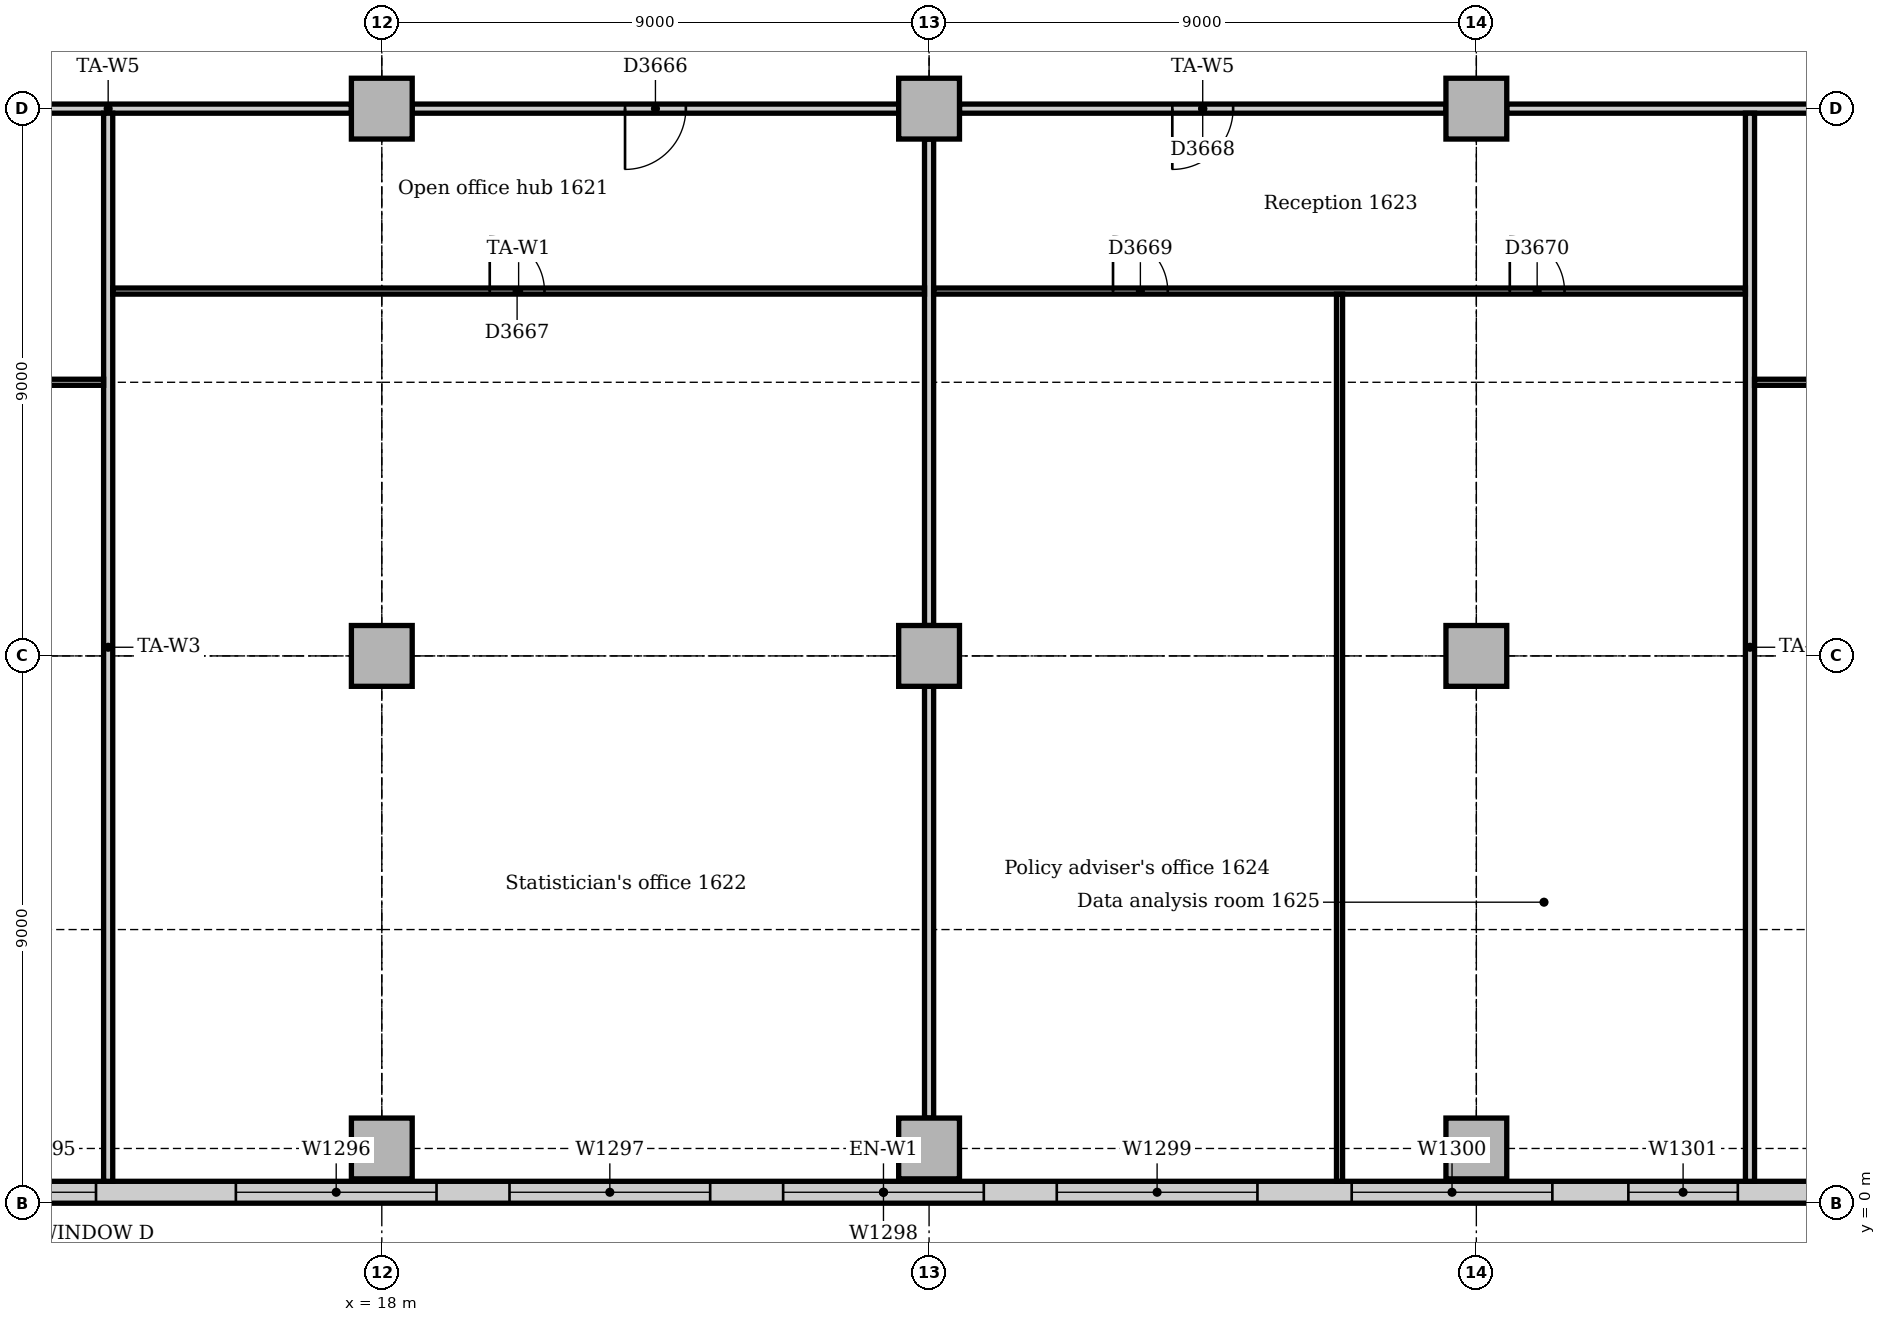
"""IFC4 building model, lengths in metres.
Left out: names, types, materials, properties, quantities, classifications, styles, units other than length and angle.
Written with IfcOpenShell. Run it as: python <this file> out.ifc"""

import sys

from ifc_helpers import new_model, si_unit, direction, frame, frame_2d, origin, origin_2d, place, context, subcontext, project, spatial, rectangle, extrude, element, fill, save


model = new_model("IFC4")
c1 = context("Model", 3, precision=1e-05, world=origin(), true_north=direction((0.0, 1.0)))
c2 = subcontext(c1, "Body", "Model", "MODEL_VIEW")
j1 = project(units=[si_unit("LENGTHUNIT", "METRE"), si_unit("PLANEANGLEUNIT", "RADIAN")], contexts=[c1])
p1 = place(None, origin())
s1 = spatial("IfcSite", under=j1, at=p1, CompositionType="ELEMENT")
p2 = place(p1, origin())
s2 = spatial("IfcBuilding", under=s1, at=p2, CompositionType="ELEMENT")
p3 = place(p2, frame((0.0, 0.0, 71.0)))
s3 = spatial("IfcBuildingStorey", under=s2, at=p3, CompositionType="ELEMENT", Elevation=71.0)
for number, where, z_axis, x_axis in (
    (1, (18.0, 0.9, 0.0), (0.0, 0.0, 1.0), (1.0, 0.0, 0.0)),
    (2, (27.0, 0.9, 0.0), (0.0, 0.0, 1.0), (1.0, 0.0, 0.0)),
    (3, (36.0, 0.9, 0.0), (0.0, 0.0, 1.0), (1.0, 0.0, 0.0)),
    (4, (18.0, 9.0, 0.0), (0.0, 0.0, 1.0), (1.0, 0.0, 0.0)),
    (5, (18.0, 18.0, 0.0), (0.0, 0.0, 1.0), (1.0, 0.0, 0.0)),
    (6, (27.0, 9.0, 0.0), (0.0, 0.0, 1.0), (1.0, 0.0, 0.0)),
    (7, (27.0, 18.0, 0.0), (0.0, 0.0, 1.0), (1.0, 0.0, 0.0)),
    (8, (36.0, 9.0, 0.0), (0.0, 0.0, 1.0), (1.0, 0.0, 0.0)),
    (9, (36.0, 18.0, 0.0), (0.0, 0.0, 1.0), (1.0, 0.0, 0.0)),
):
    element("IfcColumn", number, at=place(p3, frame(where, z_axis=z_axis, x_axis=x_axis)), inside=s3, PredefinedType="COLUMN", context=c2, shape_type="SweptSolid", body=[
        extrude(rectangle(XDim=1.0, YDim=1.0, at=origin_2d()), origin(), (0.0, 0.0, 1.0), 3.85),
    ])
p4 = place(p3, frame((4.243, 0.18, 0.0), z_axis=(0.0, 0.0, 1.0), x_axis=(1.0, 0.0, 0.0)))
e10 = element("IfcWall", 10, at=p4, inside=s3, PredefinedType="STANDARD", context=c2, shape_type="SweptSolid", body=[
    extrude(rectangle(XDim=44.015, YDim=0.36, at=frame_2d((22.007, 0.0))), origin(), (0.0, 0.0, 1.0), 3.85),
])
p5 = place(p4, frame((2.357, 0.0, 0.9)))
e11 = element("IfcOpeningElement", 11, at=p5, cuts=e10, PredefinedType="OPENING", context=c2, shape_type="SweptSolid", body=[
    extrude(rectangle(XDim=3.3, YDim=1.6, at=frame_2d((1.65, 0.8))), frame((0.0, 0.19, 0.0), z_axis=(0.0, -1.0, 0.0), x_axis=(1.0, 0.0, 0.0)), (0.0, 0.0, 1.0), 0.38),
])
p6 = place(p4, frame((7.257, 0.0, 0.9)))
e12 = element("IfcOpeningElement", 12, at=p6, cuts=e10, PredefinedType="OPENING", context=c2, shape_type="SweptSolid", body=[
    extrude(rectangle(XDim=1.8, YDim=1.6, at=frame_2d((0.9, 0.8))), frame((0.0, 0.19, 0.0), z_axis=(0.0, -1.0, 0.0), x_axis=(1.0, 0.0, 0.0)), (0.0, 0.0, 1.0), 0.38),
])
p7 = place(p4, frame((11.357, 0.0, 0.9)))
e13 = element("IfcOpeningElement", 13, at=p7, cuts=e10, PredefinedType="OPENING", context=c2, shape_type="SweptSolid", body=[
    extrude(rectangle(XDim=3.3, YDim=1.6, at=frame_2d((1.65, 0.8))), frame((0.0, 0.19, 0.0), z_axis=(0.0, -1.0, 0.0), x_axis=(1.0, 0.0, 0.0)), (0.0, 0.0, 1.0), 0.38),
])
p8 = place(p4, frame((15.857, 0.0, 0.9)))
e14 = element("IfcOpeningElement", 14, at=p8, cuts=e10, PredefinedType="OPENING", context=c2, shape_type="SweptSolid", body=[
    extrude(rectangle(XDim=3.3, YDim=1.6, at=frame_2d((1.65, 0.8))), frame((0.0, 0.19, 0.0), z_axis=(0.0, -1.0, 0.0), x_axis=(1.0, 0.0, 0.0)), (0.0, 0.0, 1.0), 0.38),
])
p9 = place(p4, frame((20.357, 0.0, 0.9)))
e15 = element("IfcOpeningElement", 15, at=p9, cuts=e10, PredefinedType="OPENING", context=c2, shape_type="SweptSolid", body=[
    extrude(rectangle(XDim=3.3, YDim=1.6, at=frame_2d((1.65, 0.8))), frame((0.0, 0.19, 0.0), z_axis=(0.0, -1.0, 0.0), x_axis=(1.0, 0.0, 0.0)), (0.0, 0.0, 1.0), 0.38),
])
p10 = place(p4, frame((24.857, 0.0, 0.9)))
e16 = element("IfcOpeningElement", 16, at=p10, cuts=e10, PredefinedType="OPENING", context=c2, shape_type="SweptSolid", body=[
    extrude(rectangle(XDim=3.3, YDim=1.6, at=frame_2d((1.65, 0.8))), frame((0.0, 0.19, 0.0), z_axis=(0.0, -1.0, 0.0), x_axis=(1.0, 0.0, 0.0)), (0.0, 0.0, 1.0), 0.38),
])
p11 = place(p4, frame((29.707, 0.0, 0.9)))
e17 = element("IfcOpeningElement", 17, at=p11, cuts=e10, PredefinedType="OPENING", context=c2, shape_type="SweptSolid", body=[
    extrude(rectangle(XDim=3.3, YDim=1.6, at=frame_2d((1.65, 0.8))), frame((0.0, 0.19, 0.0), z_axis=(0.0, -1.0, 0.0), x_axis=(1.0, 0.0, 0.0)), (0.0, 0.0, 1.0), 0.38),
])
p12 = place(p4, frame((34.257, 0.0, 0.9)))
e18 = element("IfcOpeningElement", 18, at=p12, cuts=e10, PredefinedType="OPENING", context=c2, shape_type="SweptSolid", body=[
    extrude(rectangle(XDim=1.8, YDim=1.6, at=frame_2d((0.9, 0.8))), frame((0.0, 0.19, 0.0), z_axis=(0.0, -1.0, 0.0), x_axis=(1.0, 0.0, 0.0)), (0.0, 0.0, 1.0), 0.38),
])
p13 = place(p4, frame((38.357, 0.0, 0.9)))
e19 = element("IfcOpeningElement", 19, at=p13, cuts=e10, PredefinedType="OPENING", context=c2, shape_type="SweptSolid", body=[
    extrude(rectangle(XDim=3.3, YDim=1.6, at=frame_2d((1.65, 0.8))), frame((0.0, 0.19, 0.0), z_axis=(0.0, -1.0, 0.0), x_axis=(1.0, 0.0, 0.0)), (0.0, 0.0, 1.0), 0.38),
])
p14 = place(p3, frame((36.5, 18.0, 0.0), z_axis=(0.0, 0.0, 1.0), x_axis=(1.0, 0.0, 0.0)))
e20 = element("IfcWall", 20, at=p14, inside=s3, PredefinedType="PARTITIONING", context=c2, shape_type="SweptSolid", body=[
    extrude(rectangle(XDim=8.0, YDim=0.15, at=frame_2d((4.0, 0.0))), origin(), (0.0, 0.0, 1.0), 3.15),
])
p15 = place(p3, frame((27.5, 18.0, 0.0), z_axis=(0.0, 0.0, 1.0), x_axis=(1.0, 0.0, 0.0)))
e21 = element("IfcWall", 21, at=p15, inside=s3, PredefinedType="PARTITIONING", context=c2, shape_type="SweptSolid", body=[
    extrude(rectangle(XDim=8.0, YDim=0.15, at=frame_2d((4.0, 0.0))), origin(), (0.0, 0.0, 1.0), 3.15),
])
p16 = place(p15, frame((3.5, 0.0, 0.0)))
e22 = element("IfcOpeningElement", 22, at=p16, cuts=e21, PredefinedType="OPENING", context=c2, shape_type="SweptSolid", body=[
    extrude(rectangle(XDim=1.0, YDim=2.1, at=frame_2d((0.5, 1.05))), frame((0.0, 0.085, 0.0), z_axis=(0.0, -1.0, 0.0), x_axis=(1.0, 0.0, 0.0)), (0.0, 0.0, 1.0), 0.17),
])
p17 = place(p3, frame((18.5, 18.0, 0.0), z_axis=(0.0, 0.0, 1.0), x_axis=(1.0, 0.0, 0.0)))
e23 = element("IfcWall", 23, at=p17, inside=s3, PredefinedType="PARTITIONING", context=c2, shape_type="SweptSolid", body=[
    extrude(rectangle(XDim=8.0, YDim=0.15, at=frame_2d((4.0, 0.0))), origin(), (0.0, 0.0, 1.0), 3.15),
])
p18 = place(p17, frame((3.5, 0.0, 0.0)))
e24 = element("IfcOpeningElement", 24, at=p18, cuts=e23, PredefinedType="OPENING", context=c2, shape_type="SweptSolid", body=[
    extrude(rectangle(XDim=1.0, YDim=2.1, at=frame_2d((0.5, 1.05))), frame((0.0, 0.085, 0.0), z_axis=(0.0, -1.0, 0.0), x_axis=(1.0, 0.0, 0.0)), (0.0, 0.0, 1.0), 0.17),
])
p19 = place(p3, frame((9.5, 18.0, 0.0), z_axis=(0.0, 0.0, 1.0), x_axis=(1.0, 0.0, 0.0)))
e25 = element("IfcWall", 25, at=p19, inside=s3, PredefinedType="PARTITIONING", context=c2, shape_type="SweptSolid", body=[
    extrude(rectangle(XDim=8.0, YDim=0.15, at=frame_2d((4.0, 0.0))), origin(), (0.0, 0.0, 1.0), 3.15),
])
p20 = place(p3, frame((13.5, 0.36, 0.0), z_axis=(0.0, 0.0, 1.0), x_axis=(0.0, 1.0, 0.0)))
e26 = element("IfcWall", 26, at=p20, inside=s3, PredefinedType="PARTITIONING", context=c2, shape_type="SweptSolid", body=[
    extrude(rectangle(XDim=17.565, YDim=0.15, at=frame_2d((8.783, 0.0))), origin(), (0.0, 0.0, 1.0), 3.85),
])
p21 = place(p3, frame((27.0, 1.4, 0.0), z_axis=(0.0, 0.0, 1.0), x_axis=(0.0, 1.0, 0.0)))
e27 = element("IfcWall", 27, at=p21, inside=s3, PredefinedType="PARTITIONING", context=c2, shape_type="SweptSolid", body=[
    extrude(rectangle(XDim=7.1, YDim=0.15, at=frame_2d((3.55, 0.0))), origin(), (0.0, 0.0, 1.0), 3.158),
])
p22 = place(p3, frame((27.0, 9.5, 0.0), z_axis=(0.0, 0.0, 1.0), x_axis=(0.0, 1.0, 0.0)))
e28 = element("IfcWall", 28, at=p22, inside=s3, PredefinedType="PARTITIONING", context=c2, shape_type="SweptSolid", body=[
    extrude(rectangle(XDim=8.0, YDim=0.15, at=frame_2d((4.0, 0.0))), origin(), (0.0, 0.0, 1.0), 3.158),
])
p23 = place(p3, frame((40.5, 0.36, 0.0), z_axis=(0.0, 0.0, 1.0), x_axis=(0.0, 1.0, 0.0)))
e29 = element("IfcWall", 29, at=p23, inside=s3, PredefinedType="PARTITIONING", context=c2, shape_type="SweptSolid", body=[
    extrude(rectangle(XDim=17.565, YDim=0.15, at=frame_2d((8.783, 0.0))), origin(), (0.0, 0.0, 1.0), 3.85),
])
p24 = place(p3, frame((13.575, 15.0, 0.0), z_axis=(0.0, 0.0, 1.0), x_axis=(1.0, 0.0, 0.0)))
e30 = element("IfcWall", 30, at=p24, inside=s3, PredefinedType="PARTITIONING", context=c2, shape_type="SweptSolid", body=[
    extrude(rectangle(XDim=13.35, YDim=0.1, at=frame_2d((6.675, 0.0))), origin(), (0.0, 0.0, 1.0), 3.85),
])
p25 = place(p24, frame((6.2, 0.0, 0.0)))
e31 = element("IfcOpeningElement", 31, at=p25, cuts=e30, PredefinedType="OPENING", context=c2, shape_type="SweptSolid", body=[
    extrude(rectangle(XDim=0.9, YDim=2.1, at=frame_2d((0.45, 1.05))), frame((0.0, 0.06, 0.0), z_axis=(0.0, -1.0, 0.0), x_axis=(1.0, 0.0, 0.0)), (0.0, 0.0, 1.0), 0.12),
])
p26 = place(p3, frame((27.075, 15.0, 0.0), z_axis=(0.0, 0.0, 1.0), x_axis=(1.0, 0.0, 0.0)))
e32 = element("IfcWall", 32, at=p26, inside=s3, PredefinedType="PARTITIONING", context=c2, shape_type="SweptSolid", body=[
    extrude(rectangle(XDim=13.35, YDim=0.1, at=frame_2d((6.675, 0.0))), origin(), (0.0, 0.0, 1.0), 3.85),
])
p27 = place(p26, frame((2.95, 0.0, 0.0)))
e33 = element("IfcOpeningElement", 33, at=p27, cuts=e32, PredefinedType="OPENING", context=c2, shape_type="SweptSolid", body=[
    extrude(rectangle(XDim=0.9, YDim=2.1, at=frame_2d((0.45, 1.05))), frame((0.0, 0.06, 0.0), z_axis=(0.0, -1.0, 0.0), x_axis=(1.0, 0.0, 0.0)), (0.0, 0.0, 1.0), 0.12),
])
p28 = place(p26, frame((9.475, 0.0, 0.0)))
e34 = element("IfcOpeningElement", 34, at=p28, cuts=e32, PredefinedType="OPENING", context=c2, shape_type="SweptSolid", body=[
    extrude(rectangle(XDim=0.9, YDim=2.1, at=frame_2d((0.45, 1.05))), frame((0.0, 0.06, 0.0), z_axis=(0.0, -1.0, 0.0), x_axis=(1.0, 0.0, 0.0)), (0.0, 0.0, 1.0), 0.12),
])
p29 = place(p3, frame((33.75, 0.36, 0.0), z_axis=(0.0, 0.0, 1.0), x_axis=(0.0, 1.0, 0.0)))
e35 = element("IfcWall", 35, at=p29, inside=s3, PredefinedType="PARTITIONING", context=c2, shape_type="SweptSolid", body=[
    extrude(rectangle(XDim=14.59, YDim=0.1, at=frame_2d((7.295, 0.0))), origin(), (0.0, 0.0, 1.0), 3.85),
])
p30 = place(p3, frame((40.575, 13.5, 0.0), z_axis=(0.0, 0.0, 1.0), x_axis=(1.0, 0.0, 0.0)))
e36 = element("IfcWall", 36, at=p30, inside=s3, PredefinedType="PARTITIONING", context=c2, shape_type="SweptSolid", body=[
    extrude(rectangle(XDim=13.35, YDim=0.1, at=frame_2d((6.675, 0.0))), origin(), (0.0, 0.0, 1.0), 3.35),
])
p31 = place(p30, frame((6.2, 0.0, 0.0)))
e37 = element("IfcOpeningElement", 37, at=p31, cuts=e36, PredefinedType="OPENING", context=c2, shape_type="SweptSolid", body=[
    extrude(rectangle(XDim=0.9, YDim=2.1, at=frame_2d((0.45, 1.05))), frame((0.0, 0.06, 0.0), z_axis=(0.0, -1.0, 0.0), x_axis=(1.0, 0.0, 0.0)), (0.0, 0.0, 1.0), 0.12),
])
p32 = place(p3, frame((0.36, 13.5, 0.0), z_axis=(0.0, 0.0, 1.0), x_axis=(1.0, 0.0, 0.0)))
e38 = element("IfcWall", 38, at=p32, inside=s3, PredefinedType="PARTITIONING", context=c2, shape_type="SweptSolid", body=[
    extrude(rectangle(XDim=13.065, YDim=0.1, at=frame_2d((6.532, 0.0))), origin(), (0.0, 0.0, 1.0), 3.35),
])
p33 = place(p32, frame((6.1, 0.0, 0.0)))
e39 = element("IfcOpeningElement", 39, at=p33, cuts=e38, PredefinedType="OPENING", context=c2, shape_type="SweptSolid", body=[
    extrude(rectangle(XDim=0.9, YDim=2.1, at=frame_2d((0.45, 1.05))), frame((0.0, 0.06, 0.0), z_axis=(0.0, -1.0, 0.0), x_axis=(1.0, 0.0, 0.0)), (0.0, 0.0, 1.0), 0.12),
])
p34 = place(p6, origin())
e40 = element("IfcWindow", 40, at=p34, inside=s3, PartitioningType="SINGLE_PANEL", PredefinedType="WINDOW", context=c2, shape_type="SweptSolid", body=[
    extrude(rectangle(XDim=1.8, YDim=1.6, at=frame_2d((0.9, 0.8))), frame((0.0, 0.13, 0.0), z_axis=(0.0, -1.0, 0.0), x_axis=(1.0, 0.0, 0.0)), (0.0, 0.0, 1.0), 0.06),
])
fill(e12, e40)
p35 = place(p7, origin())
e41 = element("IfcWindow", 41, at=p35, inside=s3, PartitioningType="SINGLE_PANEL", PredefinedType="WINDOW", context=c2, shape_type="SweptSolid", body=[
    extrude(rectangle(XDim=3.3, YDim=1.6, at=frame_2d((1.65, 0.8))), frame((0.0, 0.13, 0.0), z_axis=(0.0, -1.0, 0.0), x_axis=(1.0, 0.0, 0.0)), (0.0, 0.0, 1.0), 0.06),
])
fill(e13, e41)
p36 = place(p8, origin())
e42 = element("IfcWindow", 42, at=p36, inside=s3, PartitioningType="SINGLE_PANEL", PredefinedType="WINDOW", context=c2, shape_type="SweptSolid", body=[
    extrude(rectangle(XDim=3.3, YDim=1.6, at=frame_2d((1.65, 0.8))), frame((0.0, 0.13, 0.0), z_axis=(0.0, -1.0, 0.0), x_axis=(1.0, 0.0, 0.0)), (0.0, 0.0, 1.0), 0.06),
])
fill(e14, e42)
p37 = place(p9, origin())
e43 = element("IfcWindow", 43, at=p37, inside=s3, PartitioningType="SINGLE_PANEL", PredefinedType="WINDOW", context=c2, shape_type="SweptSolid", body=[
    extrude(rectangle(XDim=3.3, YDim=1.6, at=frame_2d((1.65, 0.8))), frame((0.0, 0.13, 0.0), z_axis=(0.0, -1.0, 0.0), x_axis=(1.0, 0.0, 0.0)), (0.0, 0.0, 1.0), 0.06),
])
fill(e15, e43)
p38 = place(p10, origin())
e44 = element("IfcWindow", 44, at=p38, inside=s3, PartitioningType="SINGLE_PANEL", PredefinedType="WINDOW", context=c2, shape_type="SweptSolid", body=[
    extrude(rectangle(XDim=3.3, YDim=1.6, at=frame_2d((1.65, 0.8))), frame((0.0, 0.13, 0.0), z_axis=(0.0, -1.0, 0.0), x_axis=(1.0, 0.0, 0.0)), (0.0, 0.0, 1.0), 0.06),
])
fill(e16, e44)
p39 = place(p11, origin())
e45 = element("IfcWindow", 45, at=p39, inside=s3, PartitioningType="SINGLE_PANEL", PredefinedType="WINDOW", context=c2, shape_type="SweptSolid", body=[
    extrude(rectangle(XDim=3.3, YDim=1.6, at=frame_2d((1.65, 0.8))), frame((0.0, 0.13, 0.0), z_axis=(0.0, -1.0, 0.0), x_axis=(1.0, 0.0, 0.0)), (0.0, 0.0, 1.0), 0.06),
])
fill(e17, e45)
p40 = place(p12, origin())
e46 = element("IfcWindow", 46, at=p40, inside=s3, PartitioningType="SINGLE_PANEL", PredefinedType="WINDOW", context=c2, shape_type="SweptSolid", body=[
    extrude(rectangle(XDim=1.8, YDim=1.6, at=frame_2d((0.9, 0.8))), frame((0.0, 0.13, 0.0), z_axis=(0.0, -1.0, 0.0), x_axis=(1.0, 0.0, 0.0)), (0.0, 0.0, 1.0), 0.06),
])
fill(e18, e46)
p41 = place(p18, frame((1.0, 0.0, 0.0), z_axis=(0.0, 0.0, 1.0), x_axis=(-1.0, 0.0, 0.0)))
e47 = element("IfcDoor", 47, at=p41, inside=s3, OperationType="SINGLE_SWING_RIGHT", PredefinedType="DOOR", context=c2, shape_type="SweptSolid", body=[
    extrude(rectangle(XDim=1.0, YDim=2.1, at=frame_2d((0.5, 1.05))), frame((0.0, 0.025, 0.0), z_axis=(0.0, -1.0, 0.0), x_axis=(1.0, 0.0, 0.0)), (0.0, 0.0, 1.0), 0.05),
])
fill(e24, e47)
p42 = place(p25, origin())
e48 = element("IfcDoor", 48, at=p42, inside=s3, OperationType="SINGLE_SWING_LEFT", PredefinedType="DOOR", context=c2, shape_type="SweptSolid", body=[
    extrude(rectangle(XDim=0.9, YDim=2.1, at=frame_2d((0.45, 1.05))), frame((0.0, 0.025, 0.0), z_axis=(0.0, -1.0, 0.0), x_axis=(1.0, 0.0, 0.0)), (0.0, 0.0, 1.0), 0.05),
])
fill(e31, e48)
p43 = place(p16, frame((1.0, 0.0, 0.0), z_axis=(0.0, 0.0, 1.0), x_axis=(-1.0, 0.0, 0.0)))
e49 = element("IfcDoor", 49, at=p43, inside=s3, OperationType="SINGLE_SWING_RIGHT", PredefinedType="DOOR", context=c2, shape_type="SweptSolid", body=[
    extrude(rectangle(XDim=1.0, YDim=2.1, at=frame_2d((0.5, 1.05))), frame((0.0, 0.025, 0.0), z_axis=(0.0, -1.0, 0.0), x_axis=(1.0, 0.0, 0.0)), (0.0, 0.0, 1.0), 0.05),
])
fill(e22, e49)
p44 = place(p27, origin())
e50 = element("IfcDoor", 50, at=p44, inside=s3, OperationType="SINGLE_SWING_LEFT", PredefinedType="DOOR", context=c2, shape_type="SweptSolid", body=[
    extrude(rectangle(XDim=0.9, YDim=2.1, at=frame_2d((0.45, 1.05))), frame((0.0, 0.025, 0.0), z_axis=(0.0, -1.0, 0.0), x_axis=(1.0, 0.0, 0.0)), (0.0, 0.0, 1.0), 0.05),
])
fill(e33, e50)
p45 = place(p28, origin())
e51 = element("IfcDoor", 51, at=p45, inside=s3, OperationType="SINGLE_SWING_LEFT", PredefinedType="DOOR", context=c2, shape_type="SweptSolid", body=[
    extrude(rectangle(XDim=0.9, YDim=2.1, at=frame_2d((0.45, 1.05))), frame((0.0, 0.025, 0.0), z_axis=(0.0, -1.0, 0.0), x_axis=(1.0, 0.0, 0.0)), (0.0, 0.0, 1.0), 0.05),
])
fill(e34, e51)
save(model, sys.argv[1])
